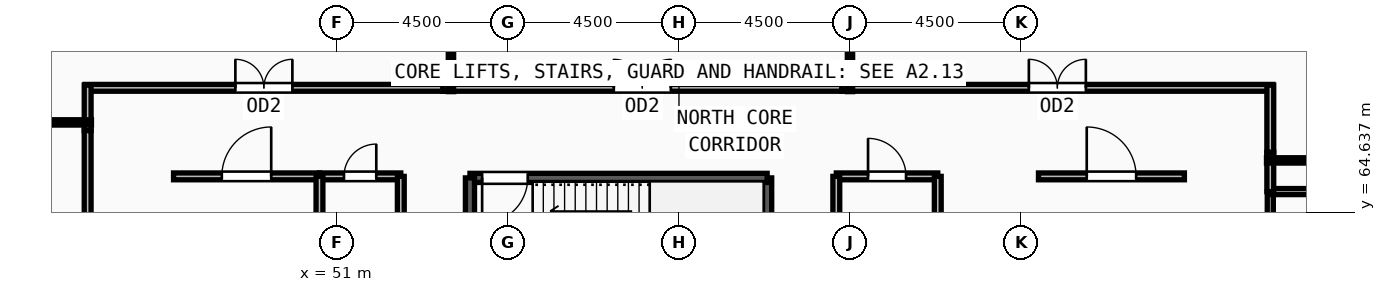
"""IFC4 building model, lengths in metres.
Left out: names, types, materials, properties, quantities, classifications, styles, units other than length and angle.
Written with IfcOpenShell. Run it as: python <this file> out.ifc"""

import sys

from ifc_helpers import new_model, si_unit, direction, frame, frame_2d, origin, place, context, subcontext, project, spatial, rectangle, extrude, source, transform, mapped, element, fill, save


model = new_model("IFC4")
c1 = context("Model", 3, precision=1e-05, world=origin(), true_north=direction((0.0, 1.0)))
c2 = subcontext(c1, "Body", "Model", "MODEL_VIEW")
j1 = project(units=[si_unit("LENGTHUNIT", "METRE"), si_unit("PLANEANGLEUNIT", "RADIAN")], contexts=[c1])
p1 = place(None, origin())
s1 = spatial("IfcSite", under=j1, at=p1, CompositionType="ELEMENT")
p2 = place(p1, origin())
s2 = spatial("IfcBuilding", under=s1, at=p2, CompositionType="ELEMENT")
p3 = place(p2, frame((0.0, 0.0, 144.0)))
s3 = spatial("IfcBuildingStorey", under=s2, at=p3, CompositionType="ELEMENT", Elevation=144.0)
p4 = place(p3, frame((62.32, 62.1, 0.0), z_axis=(0.0, 0.0, 1.0), x_axis=(0.0, 1.0, 0.0)))
e1 = element("IfcWall", 1, at=p4, inside=s3, PredefinedType="SOLIDWALL", context=c2, shape_type="SweptSolid", body=[
    extrude(rectangle(XDim=3.44, YDim=0.24, at=frame_2d((1.72, 0.0))), origin(), (0.0, 0.0, 1.0), 3.57),
])
p5 = place(p3, frame((62.32, 65.54, 0.0), z_axis=(0.0, 0.0, 1.0), x_axis=(-1.0, 0.0, 0.0)))
e2 = element("IfcWall", 2, at=p5, inside=s3, PredefinedType="SOLIDWALL", context=c2, shape_type="SweptSolid", body=[
    extrude(rectangle(XDim=7.82, YDim=0.24, at=frame_2d((3.91, 0.0))), origin(), (0.0, 0.0, 1.0), 3.57),
])
m1 = source(origin(), c2, "Body", "SweptSolid", [
    extrude(rectangle(XDim=1.2, YDim=2.2, at=frame_2d((0.6, 1.1))), frame((0.0, 0.13, 0.0), z_axis=(0.0, -1.0, 0.0), x_axis=(1.0, 0.0, 0.0)), (0.0, 0.0, 1.0), 0.26),
])
p6 = place(p5, frame((6.3, 0.0, 0.0)))
e3 = element("IfcOpeningElement", 3, at=p6, cuts=e2, PredefinedType="OPENING", context=c2, shape_type="MappedRepresentation", body=[
    mapped(m1, transform((0.0, 0.0, 0.0), x_axis=(1.0, 0.0, 0.0), y_axis=(0.0, 1.0, 0.0), z_axis=(0.0, 0.0, 1.0), scale=1.0)),
])
p7 = place(p3, frame((54.5, 65.54, 0.0), z_axis=(0.0, 0.0, 1.0), x_axis=(0.0, -1.0, 0.0)))
e4 = element("IfcWall", 4, at=p7, inside=s3, PredefinedType="SOLIDWALL", context=c2, shape_type="SweptSolid", body=[
    extrude(rectangle(XDim=3.44, YDim=0.24, at=frame_2d((1.72, 0.0))), origin(), (0.0, 0.0, 1.0), 3.57),
])
p8 = place(p3, frame((75.56, 62.44, 0.0), z_axis=(0.0, 0.0, 1.0), x_axis=(0.0, 1.0, 0.0)))
e5 = element("IfcWall", 5, at=p8, inside=s3, PredefinedType="PARTITIONING", context=c2, shape_type="SweptSolid", body=[
    extrude(rectangle(XDim=2.74, YDim=0.16, at=frame_2d((1.37, 0.0))), origin(), (0.0, 0.0, 1.0), 3.57),
])
m2 = source(origin(), c2, "Body", "SweptSolid", [
    extrude(rectangle(XDim=1.05, YDim=2.15, at=frame_2d((0.525, 1.075))), frame((0.0, 0.09, 0.0), z_axis=(0.0, -1.0, 0.0), x_axis=(1.0, 0.0, 0.0)), (0.0, 0.0, 1.0), 0.18),
])
p9 = place(p8, frame((0.845, 0.0, 0.0)))
e6 = element("IfcOpeningElement", 6, at=p9, cuts=e5, PredefinedType="OPENING", context=c2, shape_type="MappedRepresentation", body=[
    mapped(m2, transform((0.0, 0.0, 0.0), x_axis=(1.0, 0.0, 0.0), y_axis=(0.0, 1.0, 0.0), z_axis=(0.0, 0.0, 1.0), scale=1.0)),
])
p10 = place(p3, frame((50.54, 65.58, 0.0), z_axis=(0.0, 0.0, 1.0), x_axis=(1.0, 0.0, 0.0)))
e7 = element("IfcWall", 7, at=p10, inside=s3, PredefinedType="PARTITIONING", context=c2, shape_type="SweptSolid", body=[
    extrude(rectangle(XDim=2.14, YDim=0.18, at=frame_2d((1.07, 0.0))), origin(), (0.0, 0.0, 1.0), 3.57),
])
m3 = source(origin(), c2, "Body", "SweptSolid", [
    extrude(rectangle(XDim=0.85, YDim=2.1, at=frame_2d((0.425, 1.05))), frame((0.0, 0.1, 0.0), z_axis=(0.0, -1.0, 0.0), x_axis=(1.0, 0.0, 0.0)), (0.0, 0.0, 1.0), 0.2),
])
p11 = place(p10, frame((0.645, 0.0, 0.0)))
e8 = element("IfcOpeningElement", 8, at=p11, cuts=e7, PredefinedType="OPENING", context=c2, shape_type="MappedRepresentation", body=[
    mapped(m3, transform((0.0, 0.0, 0.0), x_axis=(1.0, 0.0, 0.0), y_axis=(0.0, 1.0, 0.0), z_axis=(0.0, 0.0, 1.0), scale=1.0)),
])
p12 = place(p3, frame((64.14, 65.58, 0.0), z_axis=(0.0, 0.0, 1.0), x_axis=(1.0, 0.0, 0.0)))
e9 = element("IfcWall", 9, at=p12, inside=s3, PredefinedType="PARTITIONING", context=c2, shape_type="SweptSolid", body=[
    extrude(rectangle(XDim=2.67, YDim=0.18, at=frame_2d((1.335, 0.0))), origin(), (0.0, 0.0, 1.0), 3.57),
])
m4 = source(origin(), c2, "Body", "SweptSolid", [
    extrude(rectangle(XDim=1.0, YDim=2.2, at=frame_2d((0.5, 1.1))), frame((0.0, 0.1, 0.0), z_axis=(0.0, -1.0, 0.0), x_axis=(1.0, 0.0, 0.0)), (0.0, 0.0, 1.0), 0.2),
])
p13 = place(p12, frame((0.835, 0.0, 0.0)))
e10 = element("IfcOpeningElement", 10, at=p13, cuts=e9, PredefinedType="OPENING", context=c2, shape_type="MappedRepresentation", body=[
    mapped(m4, transform((0.0, 0.0, 0.0), x_axis=(1.0, 0.0, 0.0), y_axis=(0.0, 1.0, 0.0), z_axis=(0.0, 0.0, 1.0), scale=1.0)),
])
p14 = place(p3, frame((46.7, 65.58, 0.0), z_axis=(0.0, 0.0, 1.0), x_axis=(1.0, 0.0, 0.0)))
e11 = element("IfcWall", 11, at=p14, inside=s3, PredefinedType="PARTITIONING", context=c2, shape_type="SweptSolid", body=[
    extrude(rectangle(XDim=3.84, YDim=0.18, at=frame_2d((1.92, 0.0))), origin(), (0.0, 0.0, 1.0), 3.57),
])
m5 = source(origin(), c2, "Body", "SweptSolid", [
    extrude(rectangle(XDim=1.3, YDim=2.2, at=frame_2d((0.65, 1.1))), frame((0.0, 0.1, 0.0), z_axis=(0.0, -1.0, 0.0), x_axis=(1.0, 0.0, 0.0)), (0.0, 0.0, 1.0), 0.2),
])
p15 = place(p14, frame((1.27, 0.0, 0.0)))
e12 = element("IfcOpeningElement", 12, at=p15, cuts=e11, PredefinedType="OPENING", context=c2, shape_type="MappedRepresentation", body=[
    mapped(m5, transform((0.0, 0.0, 0.0), x_axis=(1.0, 0.0, 0.0), y_axis=(0.0, 1.0, 0.0), z_axis=(0.0, 0.0, 1.0), scale=1.0)),
])
p16 = place(p3, frame((69.46, 65.58, 0.0), z_axis=(0.0, 0.0, 1.0), x_axis=(1.0, 0.0, 0.0)))
e13 = element("IfcWall", 13, at=p16, inside=s3, PredefinedType="PARTITIONING", context=c2, shape_type="SweptSolid", body=[
    extrude(rectangle(XDim=3.84, YDim=0.18, at=frame_2d((1.92, 0.0))), origin(), (0.0, 0.0, 1.0), 3.57),
])
p17 = place(p16, frame((1.27, 0.0, 0.0)))
e14 = element("IfcOpeningElement", 14, at=p17, cuts=e13, PredefinedType="OPENING", context=c2, shape_type="MappedRepresentation", body=[
    mapped(m5, transform((0.0, 0.0, 0.0), x_axis=(1.0, 0.0, 0.0), y_axis=(0.0, 1.0, 0.0), z_axis=(0.0, 0.0, 1.0), scale=1.0)),
])
p18 = place(p3, frame((64.285, 67.91, 0.0), z_axis=(0.0, 0.0, 1.0), x_axis=(1.0, 0.0, 0.0)))
e15 = element("IfcWall", 15, at=p18, inside=s3, PredefinedType="PARTITIONING", context=c2, shape_type="SweptSolid", body=[
    extrude(rectangle(XDim=11.345, YDim=0.18, at=frame_2d((5.672, 0.0))), origin(), (0.0, 0.0, 1.0), 3.57),
])
m6 = source(origin(), c2, "Body", "SweptSolid", [
    extrude(rectangle(XDim=1.5, YDim=2.2, at=frame_2d((0.75, 1.1))), frame((0.0, 0.1, 0.0), z_axis=(0.0, -1.0, 0.0), x_axis=(1.0, 0.0, 0.0)), (0.0, 0.0, 1.0), 0.2),
])
p19 = place(p18, frame((4.922, 0.0, 0.0)))
e16 = element("IfcOpeningElement", 16, at=p19, cuts=e15, PredefinedType="OPENING", context=c2, shape_type="MappedRepresentation", body=[
    mapped(m6, transform((0.0, 0.0, 0.0), x_axis=(1.0, 0.0, 0.0), y_axis=(0.0, 1.0, 0.0), z_axis=(0.0, 0.0, 1.0), scale=1.0)),
])
p20 = place(p3, frame((53.785, 67.91, 0.0), z_axis=(0.0, 0.0, 1.0), x_axis=(1.0, 0.0, 0.0)))
e17 = element("IfcWall", 17, at=p20, inside=s3, PredefinedType="PARTITIONING", context=c2, shape_type="SweptSolid", body=[
    extrude(rectangle(XDim=10.5, YDim=0.18, at=frame_2d((5.25, 0.0))), origin(), (0.0, 0.0, 1.0), 3.57),
])
p21 = place(p20, frame((4.5, 0.0, 0.0)))
e18 = element("IfcOpeningElement", 18, at=p21, cuts=e17, PredefinedType="OPENING", context=c2, shape_type="MappedRepresentation", body=[
    mapped(m6, transform((0.0, 0.0, 0.0), x_axis=(1.0, 0.0, 0.0), y_axis=(0.0, 1.0, 0.0), z_axis=(0.0, 0.0, 1.0), scale=1.0)),
])
p22 = place(p3, frame((44.37, 67.91, 0.0), z_axis=(0.0, 0.0, 1.0), x_axis=(1.0, 0.0, 0.0)))
e19 = element("IfcWall", 19, at=p22, inside=s3, PredefinedType="PARTITIONING", context=c2, shape_type="SweptSolid", body=[
    extrude(rectangle(XDim=9.415, YDim=0.18, at=frame_2d((4.708, 0.0))), origin(), (0.0, 0.0, 1.0), 3.57),
])
p23 = place(p22, frame((3.957, 0.0, 0.0)))
e20 = element("IfcOpeningElement", 20, at=p23, cuts=e19, PredefinedType="OPENING", context=c2, shape_type="MappedRepresentation", body=[
    mapped(m6, transform((0.0, 0.0, 0.0), x_axis=(1.0, 0.0, 0.0), y_axis=(0.0, 1.0, 0.0), z_axis=(0.0, 0.0, 1.0), scale=1.0)),
])
p24 = place(p3, frame((75.56, 65.18, 0.0), z_axis=(0.0, 0.0, 1.0), x_axis=(1.0, 0.0, 0.0)))
e21 = element("IfcWall", 21, at=p24, inside=s3, PredefinedType="PARTITIONING", context=c2, shape_type="SweptSolid", body=[
    extrude(rectangle(XDim=4.46, YDim=0.16, at=frame_2d((2.23, 0.0))), origin(), (0.0, 0.0, 1.0), 3.57),
])
p25 = place(p3, frame((50.54, 61.95, 0.0), z_axis=(0.0, 0.0, 1.0), x_axis=(0.0, 1.0, 0.0)))
e22 = element("IfcWall", 22, at=p25, inside=s3, PredefinedType="PARTITIONING", context=c2, shape_type="SweptSolid", body=[
    extrude(rectangle(XDim=3.63, YDim=0.18, at=frame_2d((1.815, 0.0))), origin(), (0.0, 0.0, 1.0), 3.57),
])
for number, where, z_axis, x_axis in (
    (23, (52.68, 61.875, 0.0), (0.0, 0.0, 1.0), (0.0, 1.0, 0.0)),
    (24, (64.14, 61.875, 0.0), (0.0, 0.0, 1.0), (0.0, 1.0, 0.0)),
    (25, (66.81, 61.875, 0.0), (0.0, 0.0, 1.0), (0.0, 1.0, 0.0)),
):
    element("IfcWall", number, at=place(p3, frame(where, z_axis=z_axis, x_axis=x_axis)), inside=s3, PredefinedType="PARTITIONING", context=c2, shape_type="SweptSolid", body=[
        extrude(rectangle(XDim=3.705, YDim=0.18, at=frame_2d((1.853, 0.0))), origin(), (0.0, 0.0, 1.0), 3.57),
    ])
p26 = place(p3, frame((75.56, 66.215, 0.0), z_axis=(0.0, 0.0, 1.0), x_axis=(0.0, -1.0, 0.0)))
e26 = element("IfcWall", 26, at=p26, inside=s3, PredefinedType="PARTITIONING", context=c2, shape_type="SweptSolid", body=[
    extrude(rectangle(XDim=1.035, YDim=0.18, at=frame_2d((0.518, 0.0))), origin(), (0.0, 0.0, 1.0), 3.57),
])
p27 = place(p3, frame((75.56, 67.98, 0.0), z_axis=(0.0, 0.0, 1.0), x_axis=(0.0, -1.0, 0.0)))
e27 = element("IfcWall", 27, at=p27, inside=s3, PredefinedType="PARTITIONING", context=c2, shape_type="SweptSolid", body=[
    extrude(rectangle(XDim=1.765, YDim=0.18, at=frame_2d((0.882, 0.0))), origin(), (0.0, 0.0, 1.0), 3.57),
])
p28 = place(p3, frame((44.44, 66.785, 0.0), z_axis=(0.0, 0.0, 1.0), x_axis=(0.0, 1.0, 0.0)))
e28 = element("IfcWall", 28, at=p28, inside=s3, PredefinedType="PARTITIONING", context=c2, shape_type="SweptSolid", body=[
    extrude(rectangle(XDim=1.195, YDim=0.18, at=frame_2d((0.598, 0.0))), origin(), (0.0, 0.0, 1.0), 3.57),
])
p29 = place(p3, frame((44.44, 56.19, 0.0), z_axis=(0.0, 0.0, 1.0), x_axis=(0.0, 1.0, 0.0)))
e29 = element("IfcWall", 29, at=p29, inside=s3, PredefinedType="PARTITIONING", context=c2, shape_type="SweptSolid", body=[
    extrude(rectangle(XDim=10.595, YDim=0.18, at=frame_2d((5.297, 0.0))), origin(), (0.0, 0.0, 1.0), 3.57),
])
p30 = place(p3, frame((44.54, 67.0, 0.0), z_axis=(0.0, 0.0, 1.0), x_axis=(-1.0, 0.0, 0.0)))
e30 = element("IfcWall", 30, at=p30, inside=s3, PredefinedType="PARTITIONING", context=c2, shape_type="SweptSolid", body=[
    extrude(rectangle(XDim=20.326, YDim=0.14, at=frame_2d((10.163, 0.0))), origin(), (0.0, 0.0, 1.0), 2.755),
])
p31 = place(p3, frame((75.46, 66.0, 0.0), z_axis=(0.0, 0.0, 1.0), x_axis=(1.0, 0.0, 0.0)))
e31 = element("IfcWall", 31, at=p31, inside=s3, PredefinedType="PARTITIONING", context=c2, shape_type="SweptSolid", body=[
    extrude(rectangle(XDim=19.854, YDim=0.14, at=frame_2d((9.927, 0.0))), origin(), (0.0, 0.0, 1.0), 2.755),
])
p32 = place(p3, frame((54.0, 67.81, 0.0), z_axis=(0.0, 0.0, 1.0), x_axis=(0.0, 1.0, 0.0)))
e32 = element("IfcWall", 32, at=p32, inside=s3, PredefinedType="PARTITIONING", context=c2, shape_type="SweptSolid", body=[
    extrude(rectangle(XDim=12.342, YDim=0.14, at=frame_2d((6.171, 0.0))), origin(), (0.0, 0.0, 1.0), 3.57),
])
p33 = place(p3, frame((64.5, 67.81, 0.0), z_axis=(0.0, 0.0, 1.0), x_axis=(0.0, 1.0, 0.0)))
e33 = element("IfcWall", 33, at=p33, inside=s3, PredefinedType="PARTITIONING", context=c2, shape_type="SweptSolid", body=[
    extrude(rectangle(XDim=12.146, YDim=0.14, at=frame_2d((6.073, 0.0))), origin(), (0.0, 0.0, 1.0), 3.57),
])
m7 = source(origin(), c2, "Body", "SweptSolid", [
    extrude(rectangle(XDim=1.2, YDim=2.2, at=frame_2d((0.6, 1.1))), frame((0.0, 0.025, 0.0), z_axis=(0.0, -1.0, 0.0), x_axis=(1.0, 0.0, 0.0)), (0.0, 0.0, 1.0), 0.05),
])
p34 = place(p6, origin())
e34 = element("IfcDoor", 34, at=p34, inside=s3, OperationType="SINGLE_SWING_RIGHT", PredefinedType="DOOR", context=c2, shape_type="MappedRepresentation", body=[
    mapped(m7, transform((0.0, 0.0, 0.0), x_axis=(1.0, 0.0, 0.0), y_axis=(0.0, 1.0, 0.0), z_axis=(0.0, 0.0, 1.0), scale=1.0)),
])
fill(e3, e34)
m8 = source(origin(), c2, "Body", "SweptSolid", [
    extrude(rectangle(XDim=0.85, YDim=2.1, at=frame_2d((0.425, 1.05))), frame((0.0, 0.025, 0.0), z_axis=(0.0, -1.0, 0.0), x_axis=(1.0, 0.0, 0.0)), (0.0, 0.0, 1.0), 0.05),
])
p35 = place(p11, origin())
e35 = element("IfcDoor", 35, at=p35, inside=s3, OperationType="SINGLE_SWING_RIGHT", PredefinedType="DOOR", context=c2, shape_type="MappedRepresentation", body=[
    mapped(m8, transform((0.0, 0.0, 0.0), x_axis=(1.0, 0.0, 0.0), y_axis=(0.0, 1.0, 0.0), z_axis=(0.0, 0.0, 1.0), scale=1.0)),
])
fill(e8, e35)
m9 = source(origin(), c2, "Body", "SweptSolid", [
    extrude(rectangle(XDim=1.0, YDim=2.2, at=frame_2d((0.5, 1.1))), frame((0.0, 0.025, 0.0), z_axis=(0.0, -1.0, 0.0), x_axis=(1.0, 0.0, 0.0)), (0.0, 0.0, 1.0), 0.05),
])
p36 = place(p13, origin())
e36 = element("IfcDoor", 36, at=p36, inside=s3, OperationType="SINGLE_SWING_LEFT", PredefinedType="DOOR", context=c2, shape_type="MappedRepresentation", body=[
    mapped(m9, transform((0.0, 0.0, 0.0), x_axis=(1.0, 0.0, 0.0), y_axis=(0.0, 1.0, 0.0), z_axis=(0.0, 0.0, 1.0), scale=1.0)),
])
fill(e10, e36)
m10 = source(origin(), c2, "Body", "SweptSolid", [
    extrude(rectangle(XDim=1.3, YDim=2.2, at=frame_2d((0.65, 1.1))), frame((0.0, 0.025, 0.0), z_axis=(0.0, -1.0, 0.0), x_axis=(1.0, 0.0, 0.0)), (0.0, 0.0, 1.0), 0.05),
])
p37 = place(p15, origin())
e37 = element("IfcDoor", 37, at=p37, inside=s3, OperationType="SINGLE_SWING_RIGHT", PredefinedType="DOOR", context=c2, shape_type="MappedRepresentation", body=[
    mapped(m10, transform((0.0, 0.0, 0.0), x_axis=(1.0, 0.0, 0.0), y_axis=(0.0, 1.0, 0.0), z_axis=(0.0, 0.0, 1.0), scale=1.0)),
])
fill(e12, e37)
p38 = place(p17, origin())
e38 = element("IfcDoor", 38, at=p38, inside=s3, OperationType="SINGLE_SWING_LEFT", PredefinedType="DOOR", context=c2, shape_type="MappedRepresentation", body=[
    mapped(m10, transform((0.0, 0.0, 0.0), x_axis=(1.0, 0.0, 0.0), y_axis=(0.0, 1.0, 0.0), z_axis=(0.0, 0.0, 1.0), scale=1.0)),
])
fill(e14, e38)
m11 = source(origin(), c2, "Body", "SweptSolid", [
    extrude(rectangle(XDim=1.5, YDim=2.2, at=frame_2d((0.75, 1.1))), frame((0.0, 0.025, 0.0), z_axis=(0.0, -1.0, 0.0), x_axis=(1.0, 0.0, 0.0)), (0.0, 0.0, 1.0), 0.05),
])
p39 = place(p19, origin())
e39 = element("IfcDoor", 39, at=p39, inside=s3, OperationType="DOUBLE_DOOR_SINGLE_SWING", PredefinedType="DOOR", context=c2, shape_type="MappedRepresentation", body=[
    mapped(m11, transform((0.0, 0.0, 0.0), x_axis=(1.0, 0.0, 0.0), y_axis=(0.0, 1.0, 0.0), z_axis=(0.0, 0.0, 1.0), scale=1.0)),
])
fill(e16, e39)
p40 = place(p21, origin())
e40 = element("IfcDoor", 40, at=p40, inside=s3, OperationType="DOUBLE_DOOR_SINGLE_SWING", PredefinedType="DOOR", context=c2, shape_type="MappedRepresentation", body=[
    mapped(m11, transform((0.0, 0.0, 0.0), x_axis=(1.0, 0.0, 0.0), y_axis=(0.0, 1.0, 0.0), z_axis=(0.0, 0.0, 1.0), scale=1.0)),
])
fill(e18, e40)
p41 = place(p23, origin())
e41 = element("IfcDoor", 41, at=p41, inside=s3, OperationType="DOUBLE_DOOR_SINGLE_SWING", PredefinedType="DOOR", context=c2, shape_type="MappedRepresentation", body=[
    mapped(m11, transform((0.0, 0.0, 0.0), x_axis=(1.0, 0.0, 0.0), y_axis=(0.0, 1.0, 0.0), z_axis=(0.0, 0.0, 1.0), scale=1.0)),
])
fill(e20, e41)
save(model, sys.argv[1])
